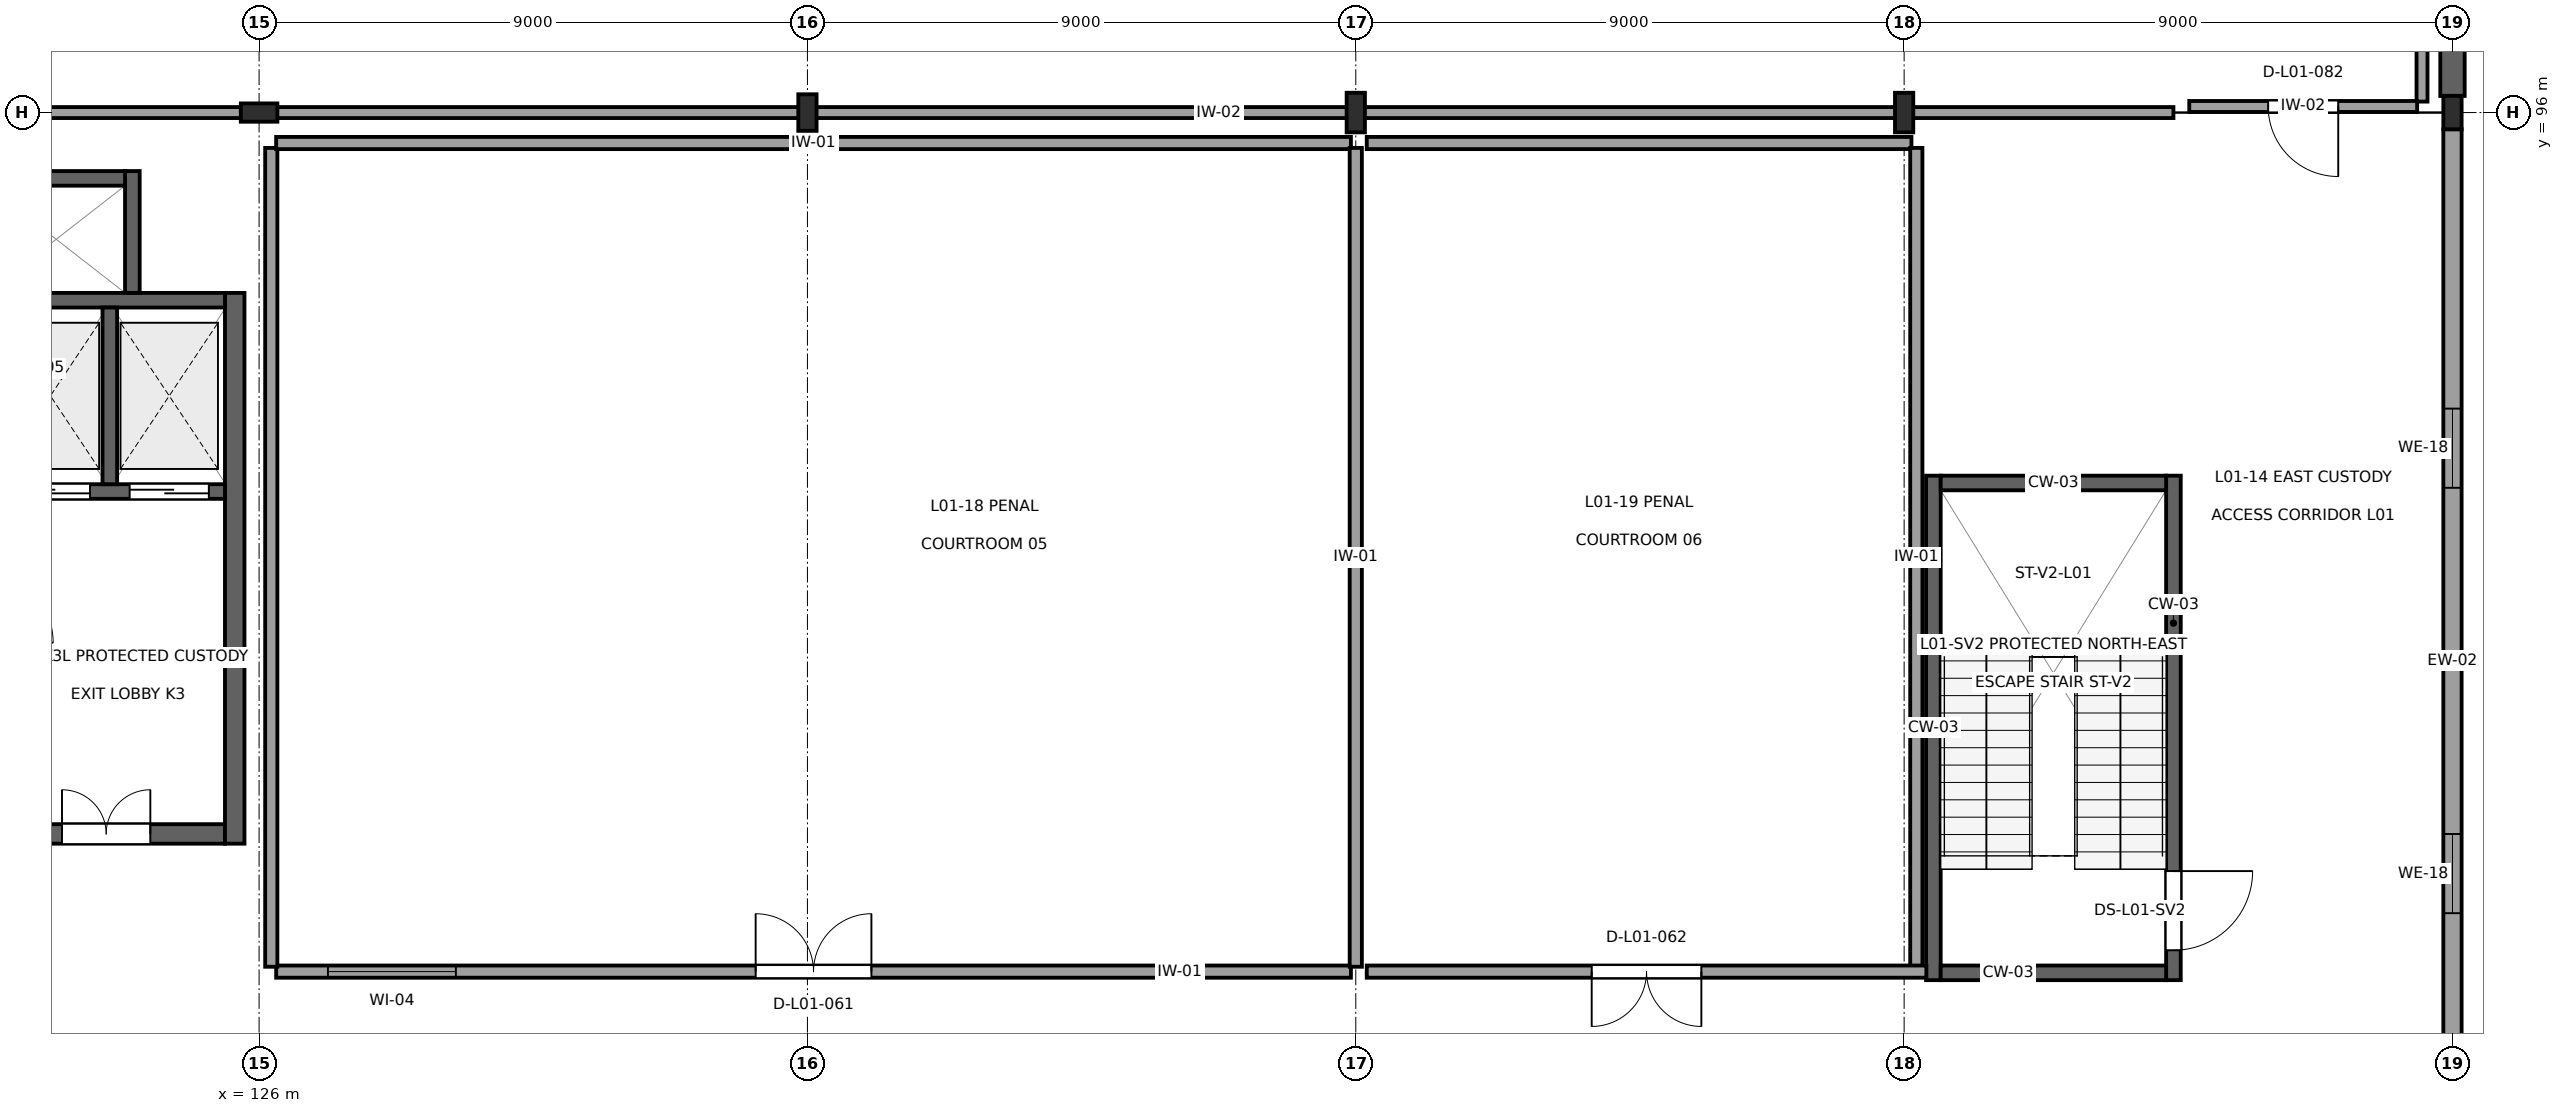
"""IFC4 building model, lengths in metres.
Left out: names, types, materials, properties, quantities, classifications, styles, units other than length and angle.
Written with IfcOpenShell. Run it as: python <this file> out.ifc"""

import sys

from ifc_helpers import new_model, si_unit, direction, frame, frame_2d, origin, origin_2d, place, context, subcontext, project, spatial, rectangle, i_section, extrude, element, fill, save


model = new_model("IFC4")
c1 = context("Model", 3, precision=1e-05, world=origin(), true_north=direction((0.0, 1.0)))
c2 = subcontext(c1, "Body", "Model", "MODEL_VIEW")
j1 = project(units=[si_unit("LENGTHUNIT", "METRE"), si_unit("PLANEANGLEUNIT", "RADIAN")], contexts=[c1])
p1 = place(None, origin())
s1 = spatial("IfcSite", under=j1, at=p1, CompositionType="ELEMENT")
p2 = place(p1, origin())
s2 = spatial("IfcBuilding", under=s1, at=p2, CompositionType="ELEMENT")
p3 = place(p2, frame((0.0, 0.0, 5.4)))
s3 = spatial("IfcBuildingStorey", under=s2, at=p3, CompositionType="ELEMENT", Elevation=5.4)
for number, where, z_axis, x_axis in (
    (1, (126.0, 96.0, 0.0), (0.0, 0.0, 1.0), (0.0, 1.0, 0.0)),
    (2, (135.0, 96.0, 0.0), (0.0, 0.0, 1.0), (1.0, 0.0, 0.0)),
):
    element("IfcColumn", number, at=place(p3, frame(where, z_axis=z_axis, x_axis=x_axis)), inside=s3, PredefinedType="COLUMN", context=c2, shape_type="SweptSolid", body=[
        extrude(i_section(OverallWidth=0.3, OverallDepth=0.6, WebThickness=0.015, FlangeThickness=0.03, at=origin_2d()), origin(), (0.0, 0.0, 1.0), 4.5),
    ])
for number, where, z_axis, x_axis in (
    (3, (144.0, 96.0, 0.0), (0.0, 0.0, 1.0), (1.0, 0.0, 0.0)),
    (4, (153.0, 96.0, 0.0), (0.0, 0.0, 1.0), (1.0, 0.0, 0.0)),
):
    element("IfcColumn", number, at=place(p3, frame(where, z_axis=z_axis, x_axis=x_axis)), inside=s3, PredefinedType="COLUMN", context=c2, shape_type="SweptSolid", body=[
        extrude(i_section(OverallWidth=0.3, OverallDepth=0.65, WebThickness=0.016, FlangeThickness=0.031, at=origin_2d()), origin(), (0.0, 0.0, 1.0), 4.5),
    ])
p4 = place(p3, frame((162.0, 96.0, 0.0), z_axis=(0.0, 0.0, 1.0), x_axis=(1.0, 0.0, 0.0)))
e5 = element("IfcColumn", 5, at=p4, inside=s3, PredefinedType="COLUMN", context=c2, shape_type="SweptSolid", body=[
    extrude(i_section(OverallWidth=0.3, OverallDepth=0.55, WebThickness=0.015, FlangeThickness=0.029, at=origin_2d()), origin(), (0.0, 0.0, 1.0), 4.5),
])
p5 = place(p3, frame((162.0, 78.273, 0.0), z_axis=(0.0, 0.0, 1.0), x_axis=(0.0, 1.0, 0.0)))
e6 = element("IfcWall", 6, at=p5, inside=s3, PredefinedType="SOLIDWALL", context=c2, shape_type="SweptSolid", body=[
    extrude(rectangle(XDim=17.454, YDim=0.3, at=frame_2d((8.727, 0.0))), origin(), (0.0, 0.0, 1.0), 3.545),
])
p6 = place(p5, frame((4.586, 0.0, 0.9)))
e7 = element("IfcOpeningElement", 7, at=p6, cuts=e6, PredefinedType="OPENING", context=c2, shape_type="SweptSolid", body=[
    extrude(rectangle(XDim=1.3, YDim=1.3, at=frame_2d((0.65, 0.65))), frame((0.0, 0.165, 0.0), z_axis=(0.0, -1.0, 0.0), x_axis=(1.0, 0.0, 0.0)), (0.0, 0.0, 1.0), 0.33),
])
p7 = place(p5, frame((11.568, 0.0, 0.9)))
e8 = element("IfcOpeningElement", 8, at=p7, cuts=e6, PredefinedType="OPENING", context=c2, shape_type="SweptSolid", body=[
    extrude(rectangle(XDim=1.3, YDim=1.3, at=frame_2d((0.65, 0.65))), frame((0.0, 0.165, 0.0), z_axis=(0.0, -1.0, 0.0), x_axis=(1.0, 0.0, 0.0)), (0.0, 0.0, 1.0), 0.33),
])
p8 = place(p3, frame((162.0, 96.273, 0.0), z_axis=(0.0, 0.0, 1.0), x_axis=(0.0, 1.0, 0.0)))
e9 = element("IfcWall", 9, at=p8, inside=s3, PredefinedType="SOLIDWALL", context=c2, shape_type="SweptSolid", body=[
    extrude(rectangle(XDim=11.599, YDim=0.4, at=frame_2d((5.8, 0.0))), origin(), (0.0, 0.0, 1.0), 4.18),
])
p9 = place(p8, frame((2.88, 0.0, 2.35)))
e10 = element("IfcOpeningElement", 10, at=p9, cuts=e9, PredefinedType="OPENING", context=c2, shape_type="SweptSolid", body=[
    extrude(rectangle(XDim=1.2, YDim=0.7, at=frame_2d((0.6, 0.35))), frame((0.0, 0.215, 0.0), z_axis=(0.0, -1.0, 0.0), x_axis=(1.0, 0.0, 0.0)), (0.0, 0.0, 1.0), 0.43),
])
p10 = place(p8, frame((7.519, 0.0, 2.35)))
e11 = element("IfcOpeningElement", 11, at=p10, cuts=e9, PredefinedType="OPENING", context=c2, shape_type="SweptSolid", body=[
    extrude(rectangle(XDim=1.2, YDim=0.7, at=frame_2d((0.6, 0.35))), frame((0.0, 0.215, 0.0), z_axis=(0.0, -1.0, 0.0), x_axis=(1.0, 0.0, 0.0)), (0.0, 0.0, 1.0), 0.43),
])
p11 = place(p3, frame((153.48, 81.76, 0.0), z_axis=(0.0, 0.0, 1.0), x_axis=(0.0, 1.0, 0.0)))
e12 = element("IfcWall", 12, at=p11, inside=s3, PredefinedType="SHEAR", context=c2, shape_type="SweptSolid", body=[
    extrude(rectangle(XDim=8.28, YDim=0.24, at=frame_2d((4.14, 0.0))), origin(), (0.0, 0.0, 1.0), 4.31),
])
p12 = place(p3, frame((157.42, 81.76, 0.0), z_axis=(0.0, 0.0, 1.0), x_axis=(0.0, 1.0, 0.0)))
e13 = element("IfcWall", 13, at=p12, inside=s3, PredefinedType="SHEAR", context=c2, shape_type="SweptSolid", body=[
    extrude(rectangle(XDim=8.28, YDim=0.24, at=frame_2d((4.14, 0.0))), origin(), (0.0, 0.0, 1.0), 4.31),
])
p13 = place(p12, frame((0.49, 0.0, 0.0)))
e14 = element("IfcOpeningElement", 14, at=p13, cuts=e13, PredefinedType="OPENING", context=c2, shape_type="SweptSolid", body=[
    extrude(rectangle(XDim=1.3, YDim=2.2, at=frame_2d((0.65, 1.1))), frame((0.0, 0.135, 0.0), z_axis=(0.0, -1.0, 0.0), x_axis=(1.0, 0.0, 0.0)), (0.0, 0.0, 1.0), 0.27),
])
for number, where, z_axis, x_axis in (
    (15, (153.6, 81.88, 0.0), (0.0, 0.0, 1.0), (1.0, 0.0, 0.0)),
    (16, (153.6, 89.92, 0.0), (0.0, 0.0, 1.0), (1.0, 0.0, 0.0)),
):
    element("IfcWall", number, at=place(p3, frame(where, z_axis=z_axis, x_axis=x_axis)), inside=s3, PredefinedType="SHEAR", context=c2, shape_type="SweptSolid", body=[
        extrude(rectangle(XDim=3.7, YDim=0.24, at=frame_2d((1.85, 0.0))), origin(), (0.0, 0.0, 1.0), 4.31),
    ])
p14 = place(p3, frame((121.54, 84.16, 0.0), z_axis=(0.0, 0.0, 1.0), x_axis=(1.0, 0.0, 0.0)))
e17 = element("IfcWall", 17, at=p14, inside=s3, PredefinedType="SHEAR", context=c2, shape_type="SweptSolid", body=[
    extrude(rectangle(XDim=3.9, YDim=0.32, at=frame_2d((1.95, 0.0))), origin(), (0.0, 0.0, 1.0), 4.16),
])
p15 = place(p14, frame((1.225, 0.0, 0.0)))
e18 = element("IfcOpeningElement", 18, at=p15, cuts=e17, PredefinedType="OPENING", context=c2, shape_type="SweptSolid", body=[
    extrude(rectangle(XDim=1.45, YDim=2.2, at=frame_2d((0.725, 1.1))), frame((0.0, 0.175, 0.0), z_axis=(0.0, -1.0, 0.0), x_axis=(1.0, 0.0, 0.0)), (0.0, 0.0, 1.0), 0.35),
])
p16 = place(p3, frame((125.6, 84.0, 0.0), z_axis=(0.0, 0.0, 1.0), x_axis=(0.0, 1.0, 0.0)))
e19 = element("IfcWall", 19, at=p16, inside=s3, PredefinedType="SHEAR", context=c2, shape_type="SweptSolid", body=[
    extrude(rectangle(XDim=9.04, YDim=0.32, at=frame_2d((4.52, 0.0))), origin(), (0.0, 0.0, 1.0), 4.16),
])
p17 = place(p3, frame((121.54, 89.78, 0.0), z_axis=(0.0, 0.0, 1.0), x_axis=(1.0, 0.0, 0.0)))
e20 = element("IfcWall", 20, at=p17, inside=s3, PredefinedType="SHEAR", context=c2, shape_type="SweptSolid", body=[
    extrude(rectangle(XDim=3.9, YDim=0.24, at=frame_2d((1.95, 0.0))), origin(), (0.0, 0.0, 1.0), 4.31),
])
p18 = place(p17, frame((0.385, 0.0, 0.0)))
e21 = element("IfcOpeningElement", 21, at=p18, cuts=e20, PredefinedType="OPENING", context=c2, shape_type="SweptSolid", body=[
    extrude(rectangle(XDim=1.3, YDim=2.2, at=frame_2d((0.65, 1.1))), frame((0.0, 0.135, 0.0), z_axis=(0.0, -1.0, 0.0), x_axis=(1.0, 0.0, 0.0)), (0.0, 0.0, 1.0), 0.27),
])
p19 = place(p17, frame((2.335, 0.0, 0.0)))
e22 = element("IfcOpeningElement", 22, at=p19, cuts=e20, PredefinedType="OPENING", context=c2, shape_type="SweptSolid", body=[
    extrude(rectangle(XDim=1.3, YDim=2.2, at=frame_2d((0.65, 1.1))), frame((0.0, 0.135, 0.0), z_axis=(0.0, -1.0, 0.0), x_axis=(1.0, 0.0, 0.0)), (0.0, 0.0, 1.0), 0.27),
])
p20 = place(p3, frame((121.54, 92.92, 0.0), z_axis=(0.0, 0.0, 1.0), x_axis=(1.0, 0.0, 0.0)))
e23 = element("IfcWall", 23, at=p20, inside=s3, PredefinedType="SHEAR", context=c2, shape_type="SweptSolid", body=[
    extrude(rectangle(XDim=3.9, YDim=0.24, at=frame_2d((1.95, 0.0))), origin(), (0.0, 0.0, 1.0), 4.31),
])
p21 = place(p3, frame((123.55, 89.9, 0.0), z_axis=(0.0, 0.0, 1.0), x_axis=(0.0, 1.0, 0.0)))
e24 = element("IfcWall", 24, at=p21, inside=s3, PredefinedType="SHEAR", context=c2, shape_type="SweptSolid", body=[
    extrude(rectangle(XDim=2.9, YDim=0.24, at=frame_2d((1.45, 0.0))), origin(), (0.0, 0.0, 1.0), 4.31),
])
p22 = place(p3, frame((123.92, 93.04, 0.0), z_axis=(0.0, 0.0, 1.0), x_axis=(0.0, 1.0, 0.0)))
e25 = element("IfcWall", 25, at=p22, inside=s3, PredefinedType="SHEAR", context=c2, shape_type="SweptSolid", body=[
    extrude(rectangle(XDim=2.0, YDim=0.24, at=frame_2d((1.0, 0.0))), origin(), (0.0, 0.0, 1.0), 4.31),
])
p23 = place(p3, frame((121.54, 94.92, 0.0), z_axis=(0.0, 0.0, 1.0), x_axis=(1.0, 0.0, 0.0)))
e26 = element("IfcWall", 26, at=p23, inside=s3, PredefinedType="SHEAR", context=c2, shape_type="SweptSolid", body=[
    extrude(rectangle(XDim=2.26, YDim=0.24, at=frame_2d((1.13, 0.0))), origin(), (0.0, 0.0, 1.0), 4.31),
])
p24 = place(p3, frame((143.92, 81.9, 0.0), z_axis=(0.0, 0.0, 1.0), x_axis=(-1.0, 0.0, 0.0)))
e27 = element("IfcWall", 27, at=p24, inside=s3, PredefinedType="PARTITIONING", context=c2, shape_type="SweptSolid", body=[
    extrude(rectangle(XDim=17.64, YDim=0.2, at=frame_2d((8.82, 0.0))), origin(), (0.0, 0.0, 1.0), 4.14),
])
p25 = place(p24, frame((7.87, 0.0, 0.0)))
e28 = element("IfcOpeningElement", 28, at=p25, cuts=e27, PredefinedType="OPENING", context=c2, shape_type="SweptSolid", body=[
    extrude(rectangle(XDim=1.9, YDim=2.5, at=frame_2d((0.95, 1.25))), frame((0.0, 0.115, 0.0), z_axis=(0.0, -1.0, 0.0), x_axis=(1.0, 0.0, 0.0)), (0.0, 0.0, 1.0), 0.23),
])
p26 = place(p24, frame((14.69, 0.0, 1.05)))
e29 = element("IfcOpeningElement", 29, at=p26, cuts=e27, PredefinedType="OPENING", context=c2, shape_type="SweptSolid", body=[
    extrude(rectangle(XDim=2.1, YDim=1.2, at=frame_2d((1.05, 0.6))), frame((0.0, 0.115, 0.0), z_axis=(0.0, -1.0, 0.0), x_axis=(1.0, 0.0, 0.0)), (0.0, 0.0, 1.0), 0.23),
])
p27 = place(p3, frame((126.2, 81.98, 0.0), z_axis=(0.0, 0.0, 1.0), x_axis=(0.0, 1.0, 0.0)))
e30 = element("IfcWall", 30, at=p27, inside=s3, PredefinedType="PARTITIONING", context=c2, shape_type="SweptSolid", body=[
    extrude(rectangle(XDim=13.44, YDim=0.2, at=frame_2d((6.72, 0.0))), origin(), (0.0, 0.0, 1.0), 3.495),
])
p28 = place(p3, frame((126.28, 95.5, 0.0), z_axis=(0.0, 0.0, 1.0), x_axis=(1.0, 0.0, 0.0)))
e31 = element("IfcWall", 31, at=p28, inside=s3, PredefinedType="PARTITIONING", context=c2, shape_type="SweptSolid", body=[
    extrude(rectangle(XDim=17.64, YDim=0.2, at=frame_2d((8.82, 0.0))), origin(), (0.0, 0.0, 1.0), 4.14),
])
p29 = place(p3, frame((144.0, 95.42, 0.0), z_axis=(0.0, 0.0, 1.0), x_axis=(0.0, -1.0, 0.0)))
e32 = element("IfcWall", 32, at=p29, inside=s3, PredefinedType="PARTITIONING", context=c2, shape_type="SweptSolid", body=[
    extrude(rectangle(XDim=13.44, YDim=0.2, at=frame_2d((6.72, 0.0))), origin(), (0.0, 0.0, 1.0), 3.405),
])
p30 = place(p3, frame((144.18, 95.5, 0.0), z_axis=(0.0, 0.0, 1.0), x_axis=(1.0, 0.0, 0.0)))
e33 = element("IfcWall", 33, at=p30, inside=s3, PredefinedType="PARTITIONING", context=c2, shape_type="SweptSolid", body=[
    extrude(rectangle(XDim=8.94, YDim=0.2, at=frame_2d((4.47, 0.0))), origin(), (0.0, 0.0, 1.0), 4.14),
])
p31 = place(p3, frame((153.2, 95.42, 0.0), z_axis=(0.0, 0.0, 1.0), x_axis=(0.0, -1.0, 0.0)))
e34 = element("IfcWall", 34, at=p31, inside=s3, PredefinedType="PARTITIONING", context=c2, shape_type="SweptSolid", body=[
    extrude(rectangle(XDim=13.44, YDim=0.2, at=frame_2d((6.72, 0.0))), origin(), (0.0, 0.0, 1.0), 3.395),
])
p32 = place(p3, frame((153.365, 81.9, 0.0), z_axis=(0.0, 0.0, 1.0), x_axis=(-1.0, 0.0, 0.0)))
e35 = element("IfcWall", 35, at=p32, inside=s3, PredefinedType="PARTITIONING", context=c2, shape_type="SweptSolid", body=[
    extrude(rectangle(XDim=9.185, YDim=0.2, at=frame_2d((4.593, 0.0))), origin(), (0.0, 0.0, 1.0), 4.14),
])
p33 = place(p32, frame((3.693, 0.0, 0.0)))
e36 = element("IfcOpeningElement", 36, at=p33, cuts=e35, PredefinedType="OPENING", context=c2, shape_type="SweptSolid", body=[
    extrude(rectangle(XDim=1.8, YDim=2.45, at=frame_2d((0.9, 1.225))), frame((0.0, 0.115, 0.0), z_axis=(0.0, -1.0, 0.0), x_axis=(1.0, 0.0, 0.0)), (0.0, 0.0, 1.0), 0.23),
])
p34 = place(p3, frame((157.42, 96.0, 0.0), z_axis=(0.0, 0.0, 1.0), x_axis=(-1.0, 0.0, 0.0)))
e37 = element("IfcWall", 37, at=p34, inside=s3, PredefinedType="PARTITIONING", context=c2, shape_type="SweptSolid", body=[
    extrude(rectangle(XDim=31.34, YDim=0.18, at=frame_2d((15.67, 0.0))), origin(), (0.0, 0.0, 1.0), 3.187),
])
p35 = place(p3, frame((125.92, 96.0, 0.0), z_axis=(0.0, 0.0, 1.0), x_axis=(-1.0, 0.0, 0.0)))
e38 = element("IfcWall", 38, at=p35, inside=s3, PredefinedType="PARTITIONING", context=c2, shape_type="SweptSolid", body=[
    extrude(rectangle(XDim=8.44, YDim=0.18, at=frame_2d((4.22, 0.0))), origin(), (0.0, 0.0, 1.0), 3.655),
])
p36 = place(p3, frame((161.5, 111.92, 0.0), z_axis=(0.0, 0.0, 1.0), x_axis=(0.0, -1.0, 0.0)))
e39 = element("IfcWall", 39, at=p36, inside=s3, PredefinedType="PARTITIONING", context=c2, shape_type="SweptSolid", body=[
    extrude(rectangle(XDim=15.74, YDim=0.18, at=frame_2d((7.87, 0.0))), origin(), (0.0, 0.0, 1.0), 4.14),
])
p37 = place(p3, frame((161.42, 96.1, 0.0), z_axis=(0.0, 0.0, 1.0), x_axis=(-1.0, 0.0, 0.0)))
e40 = element("IfcWall", 40, at=p37, inside=s3, PredefinedType="PARTITIONING", context=c2, shape_type="SweptSolid", body=[
    extrude(rectangle(XDim=3.74, YDim=0.18, at=frame_2d((1.87, 0.0))), origin(), (0.0, 0.0, 1.0), 3.187),
])
p38 = place(p37, frame((1.295, 0.0, 0.0)))
e41 = element("IfcOpeningElement", 41, at=p38, cuts=e40, PredefinedType="OPENING", context=c2, shape_type="SweptSolid", body=[
    extrude(rectangle(XDim=1.15, YDim=2.15, at=frame_2d((0.575, 1.075))), frame((0.0, 0.105, 0.0), z_axis=(0.0, -1.0, 0.0), x_axis=(1.0, 0.0, 0.0)), (0.0, 0.0, 1.0), 0.21),
])
p39 = place(p6, origin())
e42 = element("IfcWindow", 42, at=p39, inside=s3, PartitioningType="SINGLE_PANEL", PredefinedType="WINDOW", context=c2, shape_type="SweptSolid", body=[
    extrude(rectangle(XDim=1.3, YDim=1.3, at=frame_2d((0.65, 0.65))), frame((0.0, 0.03, 0.0), z_axis=(0.0, -1.0, 0.0), x_axis=(1.0, 0.0, 0.0)), (0.0, 0.0, 1.0), 0.06),
])
fill(e7, e42)
p40 = place(p7, origin())
e43 = element("IfcWindow", 43, at=p40, inside=s3, PartitioningType="SINGLE_PANEL", PredefinedType="WINDOW", context=c2, shape_type="SweptSolid", body=[
    extrude(rectangle(XDim=1.3, YDim=1.3, at=frame_2d((0.65, 0.65))), frame((0.0, 0.03, 0.0), z_axis=(0.0, -1.0, 0.0), x_axis=(1.0, 0.0, 0.0)), (0.0, 0.0, 1.0), 0.06),
])
fill(e8, e43)
p41 = place(p13, frame((1.3, 0.0, 0.0), z_axis=(0.0, 0.0, 1.0), x_axis=(-1.0, 0.0, 0.0)))
e44 = element("IfcDoor", 44, at=p41, inside=s3, OperationType="SINGLE_SWING_RIGHT", PredefinedType="DOOR", context=c2, shape_type="SweptSolid", body=[
    extrude(rectangle(XDim=1.3, YDim=2.2, at=frame_2d((0.65, 1.1))), frame((0.0, 0.025, 0.0), z_axis=(0.0, -1.0, 0.0), x_axis=(1.0, 0.0, 0.0)), (0.0, 0.0, 1.0), 0.05),
])
fill(e14, e44)
p42 = place(p15, origin())
e45 = element("IfcDoor", 45, at=p42, inside=s3, OperationType="DOUBLE_DOOR_SINGLE_SWING", PredefinedType="DOOR", context=c2, shape_type="SweptSolid", body=[
    extrude(rectangle(XDim=1.45, YDim=2.2, at=frame_2d((0.725, 1.1))), frame((0.0, 0.025, 0.0), z_axis=(0.0, -1.0, 0.0), x_axis=(1.0, 0.0, 0.0)), (0.0, 0.0, 1.0), 0.05),
])
fill(e18, e45)
p43 = place(p18, origin())
e46 = element("IfcDoor", 46, at=p43, inside=s3, OperationType="DOUBLE_DOOR_SLIDING", PredefinedType="DOOR", context=c2, shape_type="SweptSolid", body=[
    extrude(rectangle(XDim=1.3, YDim=2.2, at=frame_2d((0.65, 1.1))), frame((0.0, 0.025, 0.0), z_axis=(0.0, -1.0, 0.0), x_axis=(1.0, 0.0, 0.0)), (0.0, 0.0, 1.0), 0.05),
])
fill(e21, e46)
p44 = place(p19, origin())
e47 = element("IfcDoor", 47, at=p44, inside=s3, OperationType="DOUBLE_DOOR_SLIDING", PredefinedType="DOOR", context=c2, shape_type="SweptSolid", body=[
    extrude(rectangle(XDim=1.3, YDim=2.2, at=frame_2d((0.65, 1.1))), frame((0.0, 0.025, 0.0), z_axis=(0.0, -1.0, 0.0), x_axis=(1.0, 0.0, 0.0)), (0.0, 0.0, 1.0), 0.05),
])
fill(e22, e47)
p45 = place(p25, frame((1.9, 0.0, 0.0), z_axis=(0.0, 0.0, 1.0), x_axis=(-1.0, 0.0, 0.0)))
e48 = element("IfcDoor", 48, at=p45, inside=s3, OperationType="DOUBLE_DOOR_SINGLE_SWING", PredefinedType="DOOR", context=c2, shape_type="SweptSolid", body=[
    extrude(rectangle(XDim=1.9, YDim=2.5, at=frame_2d((0.95, 1.25))), frame((0.0, 0.025, 0.0), z_axis=(0.0, -1.0, 0.0), x_axis=(1.0, 0.0, 0.0)), (0.0, 0.0, 1.0), 0.05),
])
fill(e28, e48)
p46 = place(p26, origin())
e49 = element("IfcWindow", 49, at=p46, inside=s3, PartitioningType="SINGLE_PANEL", PredefinedType="WINDOW", context=c2, shape_type="SweptSolid", body=[
    extrude(rectangle(XDim=2.1, YDim=1.2, at=frame_2d((1.05, 0.6))), frame((0.0, 0.03, 0.0), z_axis=(0.0, -1.0, 0.0), x_axis=(1.0, 0.0, 0.0)), (0.0, 0.0, 1.0), 0.06),
])
fill(e29, e49)
p47 = place(p33, origin())
e50 = element("IfcDoor", 50, at=p47, inside=s3, OperationType="DOUBLE_DOOR_SINGLE_SWING", PredefinedType="DOOR", context=c2, shape_type="SweptSolid", body=[
    extrude(rectangle(XDim=1.8, YDim=2.45, at=frame_2d((0.9, 1.225))), frame((0.0, 0.025, 0.0), z_axis=(0.0, -1.0, 0.0), x_axis=(1.0, 0.0, 0.0)), (0.0, 0.0, 1.0), 0.05),
])
fill(e36, e50)
p48 = place(p38, origin())
e51 = element("IfcDoor", 51, at=p48, inside=s3, OperationType="SINGLE_SWING_LEFT", PredefinedType="DOOR", context=c2, shape_type="SweptSolid", body=[
    extrude(rectangle(XDim=1.15, YDim=2.15, at=frame_2d((0.575, 1.075))), frame((0.0, 0.025, 0.0), z_axis=(0.0, -1.0, 0.0), x_axis=(1.0, 0.0, 0.0)), (0.0, 0.0, 1.0), 0.05),
])
fill(e41, e51)
save(model, sys.argv[1])
